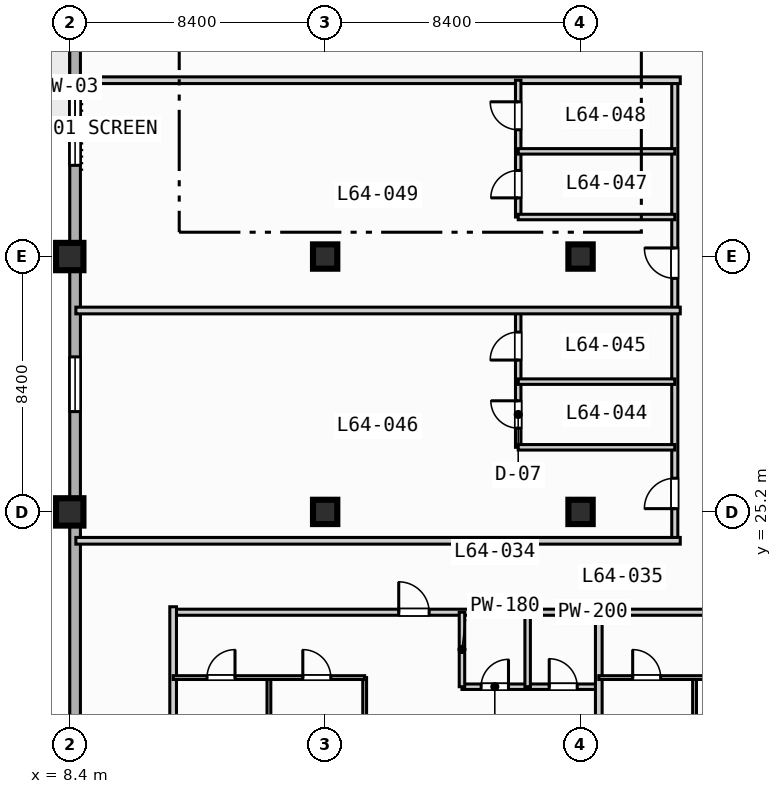
"""IFC4 building model, lengths in metres.
Left out: names, types, materials, properties, quantities, classifications, styles, units other than length and angle.
Written with IfcOpenShell. Run it as: python <this file> out.ifc"""

import sys

from ifc_helpers import new_model, si_unit, direction, frame, frame_2d, origin, origin_2d, place, context, subcontext, project, spatial, rectangle, extrude, element, fill, save


model = new_model("IFC4")
c1 = context("Model", 3, precision=1e-05, world=origin(), true_north=direction((0.0, 1.0)))
c2 = subcontext(c1, "Body", "Model", "MODEL_VIEW")
j1 = project(units=[si_unit("LENGTHUNIT", "METRE"), si_unit("PLANEANGLEUNIT", "RADIAN")], contexts=[c1])
p1 = place(None, origin())
s1 = spatial("IfcSite", under=j1, at=p1, CompositionType="ELEMENT")
p2 = place(p1, origin())
s2 = spatial("IfcBuilding", under=s1, at=p2, CompositionType="ELEMENT")
p3 = place(p2, frame((0.0, 0.0, 260.1)))
s3 = spatial("IfcBuildingStorey", under=s2, at=p3, CompositionType="ELEMENT", Elevation=260.1)
for number, where, z_axis, x_axis in (
    (1, (8.4, 25.2, 0.0), (0.0, 0.0, 1.0), (1.0, 0.0, 0.0)),
    (2, (8.4, 33.6, 0.0), (0.0, 0.0, 1.0), (1.0, 0.0, 0.0)),
):
    element("IfcColumn", number, at=place(p3, frame(where, z_axis=z_axis, x_axis=x_axis)), inside=s3, PredefinedType="COLUMN", context=c2, shape_type="SweptSolid", body=[
        extrude(rectangle(XDim=0.9, YDim=0.9, at=origin_2d()), origin(), (0.0, 0.0, 1.0), 3.7),
    ])
for number, where, z_axis, x_axis in (
    (3, (16.8, 25.2, 0.0), (0.0, 0.0, 1.0), (1.0, 0.0, 0.0)),
    (4, (16.8, 33.6, 0.0), (0.0, 0.0, 1.0), (1.0, 0.0, 0.0)),
    (5, (25.2, 25.2, 0.0), (0.0, 0.0, 1.0), (1.0, 0.0, 0.0)),
    (6, (25.2, 33.6, 0.0), (0.0, 0.0, 1.0), (1.0, 0.0, 0.0)),
):
    element("IfcColumn", number, at=place(p3, frame(where, z_axis=z_axis, x_axis=x_axis)), inside=s3, PredefinedType="COLUMN", context=c2, shape_type="SweptSolid", body=[
        extrude(rectangle(XDim=0.8, YDim=0.8, at=origin_2d()), origin(), (0.0, 0.0, 1.0), 3.7),
    ])
p4 = place(p3, frame((8.575, 11.575, 0.0), z_axis=(0.0, 0.0, 1.0), x_axis=(0.0, 1.0, 0.0)))
e7 = element("IfcWall", 7, at=p4, inside=s3, PredefinedType="STANDARD", context=c2, shape_type="SweptSolid", body=[
    extrude(rectangle(XDim=60.85, YDim=0.35, at=frame_2d((30.425, 0.0))), origin(), (0.0, 0.0, 1.0), 3.47),
])
p5 = place(p4, frame((33.925, 0.0, 0.0)))
e8 = element("IfcOpeningElement", 8, at=p5, cuts=e7, PredefinedType="OPENING", context=c2, shape_type="SweptSolid", body=[
    extrude(rectangle(XDim=1.4, YDim=2.2, at=frame_2d((0.7, 1.1))), frame((0.0, 0.185, 0.0), z_axis=(0.0, -1.0, 0.0), x_axis=(1.0, 0.0, 0.0)), (0.0, 0.0, 1.0), 0.37),
])
p6 = place(p4, frame((16.925, 0.0, 0.85)))
e9 = element("IfcOpeningElement", 9, at=p6, cuts=e7, PredefinedType="OPENING", context=c2, shape_type="SweptSolid", body=[
    extrude(rectangle(XDim=1.8, YDim=1.8, at=frame_2d((0.9, 0.9))), frame((0.0, 0.185, 0.0), z_axis=(0.0, -1.0, 0.0), x_axis=(1.0, 0.0, 0.0)), (0.0, 0.0, 1.0), 0.37),
])
p7 = place(p4, frame((25.025, 0.0, 0.85)))
e10 = element("IfcOpeningElement", 10, at=p7, cuts=e7, PredefinedType="OPENING", context=c2, shape_type="SweptSolid", body=[
    extrude(rectangle(XDim=2.4, YDim=1.95, at=frame_2d((1.2, 0.975))), frame((0.0, 0.185, 0.0), z_axis=(0.0, -1.0, 0.0), x_axis=(1.0, 0.0, 0.0)), (0.0, 0.0, 1.0), 0.37),
])
p8 = place(p4, frame((41.825, 0.0, 0.85)))
e11 = element("IfcOpeningElement", 11, at=p8, cuts=e7, PredefinedType="OPENING", context=c2, shape_type="SweptSolid", body=[
    extrude(rectangle(XDim=2.4, YDim=1.95, at=frame_2d((1.2, 0.975))), frame((0.0, 0.185, 0.0), z_axis=(0.0, -1.0, 0.0), x_axis=(1.0, 0.0, 0.0)), (0.0, 0.0, 1.0), 0.37),
])
p9 = place(p3, frame((11.8, 21.9, 0.0), z_axis=(0.0, 0.0, 1.0), x_axis=(1.0, 0.0, 0.0)))
e12 = element("IfcWall", 12, at=p9, inside=s3, PredefinedType="PARTITIONING", context=c2, shape_type="SweptSolid", body=[
    extrude(rectangle(XDim=27.6, YDim=0.2, at=frame_2d((13.8, 0.0))), origin(), (0.0, 0.0, 1.0), 3.47),
])
p10 = place(p9, frame((7.42, 0.0, 0.0)))
e13 = element("IfcOpeningElement", 13, at=p10, cuts=e12, PredefinedType="OPENING", context=c2, shape_type="SweptSolid", body=[
    extrude(rectangle(XDim=1.0, YDim=2.15, at=frame_2d((0.5, 1.075))), frame((0.0, 0.11, 0.0), z_axis=(0.0, -1.0, 0.0), x_axis=(1.0, 0.0, 0.0)), (0.0, 0.0, 1.0), 0.22),
])
p11 = place(p9, frame((21.22, 0.0, 0.0)))
e14 = element("IfcOpeningElement", 14, at=p11, cuts=e12, PredefinedType="OPENING", context=c2, shape_type="SweptSolid", body=[
    extrude(rectangle(XDim=1.0, YDim=2.15, at=frame_2d((0.5, 1.075))), frame((0.0, 0.11, 0.0), z_axis=(0.0, -1.0, 0.0), x_axis=(1.0, 0.0, 0.0)), (0.0, 0.0, 1.0), 0.22),
])
p12 = place(p3, frame((11.8, 8.6, 0.0), z_axis=(0.0, 0.0, 1.0), x_axis=(0.0, 1.0, 0.0)))
e15 = element("IfcWall", 15, at=p12, inside=s3, PredefinedType="PARTITIONING", context=c2, shape_type="SweptSolid", body=[
    extrude(rectangle(XDim=13.48, YDim=0.22, at=frame_2d((6.74, 0.0))), origin(), (0.0, 0.0, 1.0), 3.47),
])
p13 = place(p3, frame((21.3, 19.45, 0.0), z_axis=(0.0, 0.0, 1.0), x_axis=(1.0, 0.0, 0.0)))
e16 = element("IfcWall", 16, at=p13, inside=s3, PredefinedType="PLUMBINGWALL", context=c2, shape_type="SweptSolid", body=[
    extrude(rectangle(XDim=4.5, YDim=0.18, at=frame_2d((2.25, 0.0))), origin(), (0.0, 0.0, 1.0), 3.47),
])
p14 = place(p13, frame((0.63, 0.0, 0.0)))
e17 = element("IfcOpeningElement", 17, at=p14, cuts=e16, PredefinedType="OPENING", context=c2, shape_type="SweptSolid", body=[
    extrude(rectangle(XDim=0.9, YDim=2.1, at=frame_2d((0.45, 1.05))), frame((0.0, 0.1, 0.0), z_axis=(0.0, -1.0, 0.0), x_axis=(1.0, 0.0, 0.0)), (0.0, 0.0, 1.0), 0.2),
])
p15 = place(p13, frame((2.87, 0.0, 0.0)))
e18 = element("IfcOpeningElement", 18, at=p15, cuts=e16, PredefinedType="OPENING", context=c2, shape_type="SweptSolid", body=[
    extrude(rectangle(XDim=0.92, YDim=2.1, at=frame_2d((0.46, 1.05))), frame((0.0, 0.1, 0.0), z_axis=(0.0, -1.0, 0.0), x_axis=(1.0, 0.0, 0.0)), (0.0, 0.0, 1.0), 0.2),
])
for number, where, z_axis, x_axis in (
    (19, (21.3, 19.45, 0.0), (0.0, 0.0, 1.0), (0.0, 1.0, 0.0)),
    (20, (23.46, 19.45, 0.0), (0.0, 0.0, 1.0), (0.0, 1.0, 0.0)),
):
    element("IfcWall", number, at=place(p3, frame(where, z_axis=z_axis, x_axis=x_axis)), inside=s3, PredefinedType="PLUMBINGWALL", context=c2, shape_type="SweptSolid", body=[
        extrude(rectangle(XDim=2.45, YDim=0.18, at=frame_2d((1.225, 0.0))), origin(), (0.0, 0.0, 1.0), 3.47),
    ])
for number, where, z_axis, x_axis in (
    (21, (14.95, 8.75, 0.0), (0.0, 0.0, 1.0), (0.0, 1.0, 0.0)),
    (22, (18.1, 8.75, 0.0), (0.0, 0.0, 1.0), (0.0, 1.0, 0.0)),
):
    element("IfcWall", number, at=place(p3, frame(where, z_axis=z_axis, x_axis=x_axis)), inside=s3, PredefinedType="PARTITIONING", context=c2, shape_type="SweptSolid", body=[
        extrude(rectangle(XDim=11.0, YDim=0.125, at=frame_2d((5.5, 0.0))), origin(), (0.0, 0.0, 1.0), 3.47),
    ])
p16 = place(p3, frame((11.8, 19.75, 0.0), z_axis=(0.0, 0.0, 1.0), x_axis=(1.0, 0.0, 0.0)))
e23 = element("IfcWall", 23, at=p16, inside=s3, PredefinedType="PARTITIONING", context=c2, shape_type="SweptSolid", body=[
    extrude(rectangle(XDim=6.3, YDim=0.125, at=frame_2d((3.15, 0.0))), origin(), (0.0, 0.0, 1.0), 3.47),
])
p17 = place(p16, frame((1.115, 0.0, 0.0)))
e24 = element("IfcOpeningElement", 24, at=p17, cuts=e23, PredefinedType="OPENING", context=c2, shape_type="SweptSolid", body=[
    extrude(rectangle(XDim=0.92, YDim=2.1, at=frame_2d((0.46, 1.05))), frame((0.0, 0.073, 0.0), z_axis=(0.0, -1.0, 0.0), x_axis=(1.0, 0.0, 0.0)), (0.0, 0.0, 1.0), 0.145),
])
p18 = place(p16, frame((4.265, 0.0, 0.0)))
e25 = element("IfcOpeningElement", 25, at=p18, cuts=e23, PredefinedType="OPENING", context=c2, shape_type="SweptSolid", body=[
    extrude(rectangle(XDim=0.92, YDim=2.1, at=frame_2d((0.46, 1.05))), frame((0.0, 0.073, 0.0), z_axis=(0.0, -1.0, 0.0), x_axis=(1.0, 0.0, 0.0)), (0.0, 0.0, 1.0), 0.145),
])
p19 = place(p3, frame((25.8, 8.6, 0.0), z_axis=(0.0, 0.0, 1.0), x_axis=(0.0, 1.0, 0.0)))
e26 = element("IfcWall", 26, at=p19, inside=s3, PredefinedType="PARTITIONING", context=c2, shape_type="SweptSolid", body=[
    extrude(rectangle(XDim=13.48, YDim=0.22, at=frame_2d((6.74, 0.0))), origin(), (0.0, 0.0, 1.0), 3.47),
])
p20 = place(p3, frame((28.95, 8.75, 0.0), z_axis=(0.0, 0.0, 1.0), x_axis=(0.0, 1.0, 0.0)))
e27 = element("IfcWall", 27, at=p20, inside=s3, PredefinedType="PARTITIONING", context=c2, shape_type="SweptSolid", body=[
    extrude(rectangle(XDim=11.0, YDim=0.125, at=frame_2d((5.5, 0.0))), origin(), (0.0, 0.0, 1.0), 3.47),
])
p21 = place(p3, frame((25.8, 19.75, 0.0), z_axis=(0.0, 0.0, 1.0), x_axis=(1.0, 0.0, 0.0)))
e28 = element("IfcWall", 28, at=p21, inside=s3, PredefinedType="PARTITIONING", context=c2, shape_type="SweptSolid", body=[
    extrude(rectangle(XDim=6.3, YDim=0.125, at=frame_2d((3.15, 0.0))), origin(), (0.0, 0.0, 1.0), 3.47),
])
p22 = place(p21, frame((1.115, 0.0, 0.0)))
e29 = element("IfcOpeningElement", 29, at=p22, cuts=e28, PredefinedType="OPENING", context=c2, shape_type="SweptSolid", body=[
    extrude(rectangle(XDim=0.92, YDim=2.1, at=frame_2d((0.46, 1.05))), frame((0.0, 0.073, 0.0), z_axis=(0.0, -1.0, 0.0), x_axis=(1.0, 0.0, 0.0)), (0.0, 0.0, 1.0), 0.145),
])
p23 = place(p21, frame((4.265, 0.0, 0.0)))
e30 = element("IfcOpeningElement", 30, at=p23, cuts=e28, PredefinedType="OPENING", context=c2, shape_type="SweptSolid", body=[
    extrude(rectangle(XDim=0.92, YDim=2.1, at=frame_2d((0.46, 1.05))), frame((0.0, 0.073, 0.0), z_axis=(0.0, -1.0, 0.0), x_axis=(1.0, 0.0, 0.0)), (0.0, 0.0, 1.0), 0.145),
])
p24 = place(p3, frame((28.3, 24.25, 0.0), z_axis=(0.0, 0.0, 1.0), x_axis=(0.0, 1.0, 0.0)))
e31 = element("IfcWall", 31, at=p24, inside=s3, PredefinedType="PARTITIONING", context=c2, shape_type="SweptSolid", body=[
    extrude(rectangle(XDim=15.15, YDim=0.2, at=frame_2d((7.575, 0.0))), origin(), (0.0, 0.0, 1.0), 3.47),
])
p25 = place(p24, frame((1.058, 0.0, 0.0)))
e32 = element("IfcOpeningElement", 32, at=p25, cuts=e31, PredefinedType="OPENING", context=c2, shape_type="SweptSolid", body=[
    extrude(rectangle(XDim=1.0, YDim=2.15, at=frame_2d((0.5, 1.075))), frame((0.0, 0.11, 0.0), z_axis=(0.0, -1.0, 0.0), x_axis=(1.0, 0.0, 0.0)), (0.0, 0.0, 1.0), 0.22),
])
p26 = place(p24, frame((8.633, 0.0, 0.0)))
e33 = element("IfcOpeningElement", 33, at=p26, cuts=e31, PredefinedType="OPENING", context=c2, shape_type="SweptSolid", body=[
    extrude(rectangle(XDim=1.0, YDim=2.15, at=frame_2d((0.5, 1.075))), frame((0.0, 0.11, 0.0), z_axis=(0.0, -1.0, 0.0), x_axis=(1.0, 0.0, 0.0)), (0.0, 0.0, 1.0), 0.22),
])
p27 = place(p3, frame((8.6, 24.25, 0.0), z_axis=(0.0, 0.0, 1.0), x_axis=(1.0, 0.0, 0.0)))
e34 = element("IfcWall", 34, at=p27, inside=s3, PredefinedType="PARTITIONING", context=c2, shape_type="SweptSolid", body=[
    extrude(rectangle(XDim=19.88, YDim=0.22, at=frame_2d((9.94, 0.0))), origin(), (0.0, 0.0, 1.0), 3.47),
])
p28 = place(p3, frame((23.15, 27.325, 0.0), z_axis=(0.0, 0.0, 1.0), x_axis=(0.0, 1.0, 0.0)))
e35 = element("IfcWall", 35, at=p28, inside=s3, PredefinedType="PLUMBINGWALL", context=c2, shape_type="SweptSolid", body=[
    extrude(rectangle(XDim=4.5, YDim=0.18, at=frame_2d((2.25, 0.0))), origin(), (0.0, 0.0, 1.0), 3.47),
])
p29 = place(p28, frame((0.63, 0.0, 0.0)))
e36 = element("IfcOpeningElement", 36, at=p29, cuts=e35, PredefinedType="OPENING", context=c2, shape_type="SweptSolid", body=[
    extrude(rectangle(XDim=0.9, YDim=2.1, at=frame_2d((0.45, 1.05))), frame((0.0, 0.1, 0.0), z_axis=(0.0, -1.0, 0.0), x_axis=(1.0, 0.0, 0.0)), (0.0, 0.0, 1.0), 0.2),
])
p30 = place(p28, frame((2.87, 0.0, 0.0)))
e37 = element("IfcOpeningElement", 37, at=p30, cuts=e35, PredefinedType="OPENING", context=c2, shape_type="SweptSolid", body=[
    extrude(rectangle(XDim=0.92, YDim=2.1, at=frame_2d((0.46, 1.05))), frame((0.0, 0.1, 0.0), z_axis=(0.0, -1.0, 0.0), x_axis=(1.0, 0.0, 0.0)), (0.0, 0.0, 1.0), 0.2),
])
for number, where, z_axis, x_axis in (
    (38, (23.15, 27.325, 0.0), (0.0, 0.0, 1.0), (1.0, 0.0, 0.0)),
    (39, (23.15, 29.485, 0.0), (0.0, 0.0, 1.0), (1.0, 0.0, 0.0)),
):
    element("IfcWall", number, at=place(p3, frame(where, z_axis=z_axis, x_axis=x_axis)), inside=s3, PredefinedType="PLUMBINGWALL", context=c2, shape_type="SweptSolid", body=[
        extrude(rectangle(XDim=5.15, YDim=0.18, at=frame_2d((2.575, 0.0))), origin(), (0.0, 0.0, 1.0), 3.47),
    ])
for number, where, z_axis, x_axis in (
    (40, (8.6, 31.825, 0.0), (0.0, 0.0, 1.0), (1.0, 0.0, 0.0)),
    (41, (8.6, 39.4, 0.0), (0.0, 0.0, 1.0), (1.0, 0.0, 0.0)),
):
    element("IfcWall", number, at=place(p3, frame(where, z_axis=z_axis, x_axis=x_axis)), inside=s3, PredefinedType="PARTITIONING", context=c2, shape_type="SweptSolid", body=[
        extrude(rectangle(XDim=19.88, YDim=0.22, at=frame_2d((9.94, 0.0))), origin(), (0.0, 0.0, 1.0), 3.47),
    ])
p31 = place(p3, frame((23.15, 34.9, 0.0), z_axis=(0.0, 0.0, 1.0), x_axis=(0.0, 1.0, 0.0)))
e42 = element("IfcWall", 42, at=p31, inside=s3, PredefinedType="PLUMBINGWALL", context=c2, shape_type="SweptSolid", body=[
    extrude(rectangle(XDim=4.5, YDim=0.18, at=frame_2d((2.25, 0.0))), origin(), (0.0, 0.0, 1.0), 3.47),
])
p32 = place(p31, frame((0.63, 0.0, 0.0)))
e43 = element("IfcOpeningElement", 43, at=p32, cuts=e42, PredefinedType="OPENING", context=c2, shape_type="SweptSolid", body=[
    extrude(rectangle(XDim=0.9, YDim=2.1, at=frame_2d((0.45, 1.05))), frame((0.0, 0.1, 0.0), z_axis=(0.0, -1.0, 0.0), x_axis=(1.0, 0.0, 0.0)), (0.0, 0.0, 1.0), 0.2),
])
p33 = place(p31, frame((2.87, 0.0, 0.0)))
e44 = element("IfcOpeningElement", 44, at=p33, cuts=e42, PredefinedType="OPENING", context=c2, shape_type="SweptSolid", body=[
    extrude(rectangle(XDim=0.92, YDim=2.1, at=frame_2d((0.46, 1.05))), frame((0.0, 0.1, 0.0), z_axis=(0.0, -1.0, 0.0), x_axis=(1.0, 0.0, 0.0)), (0.0, 0.0, 1.0), 0.2),
])
for number, where, z_axis, x_axis in (
    (45, (23.15, 34.9, 0.0), (0.0, 0.0, 1.0), (1.0, 0.0, 0.0)),
    (46, (23.15, 37.06, 0.0), (0.0, 0.0, 1.0), (1.0, 0.0, 0.0)),
):
    element("IfcWall", number, at=place(p3, frame(where, z_axis=z_axis, x_axis=x_axis)), inside=s3, PredefinedType="PLUMBINGWALL", context=c2, shape_type="SweptSolid", body=[
        extrude(rectangle(XDim=5.15, YDim=0.18, at=frame_2d((2.575, 0.0))), origin(), (0.0, 0.0, 1.0), 3.47),
    ])
p34 = place(p6, origin())
e47 = element("IfcWindow", 47, at=p34, inside=s3, PartitioningType="SINGLE_PANEL", PredefinedType="WINDOW", context=c2, shape_type="SweptSolid", body=[
    extrude(rectangle(XDim=1.8, YDim=1.8, at=frame_2d((0.9, 0.9))), frame((0.0, 0.03, 0.0), z_axis=(0.0, -1.0, 0.0), x_axis=(1.0, 0.0, 0.0)), (0.0, 0.0, 1.0), 0.06),
])
fill(e9, e47)
p35 = place(p7, origin())
e48 = element("IfcWindow", 48, at=p35, inside=s3, PartitioningType="SINGLE_PANEL", PredefinedType="WINDOW", context=c2, shape_type="SweptSolid", body=[
    extrude(rectangle(XDim=2.4, YDim=1.95, at=frame_2d((1.2, 0.975))), frame((0.0, 0.03, 0.0), z_axis=(0.0, -1.0, 0.0), x_axis=(1.0, 0.0, 0.0)), (0.0, 0.0, 1.0), 0.06),
])
fill(e10, e48)
p36 = place(p10, origin())
e49 = element("IfcDoor", 49, at=p36, inside=s3, OperationType="SINGLE_SWING_LEFT", PredefinedType="DOOR", context=c2, shape_type="SweptSolid", body=[
    extrude(rectangle(XDim=1.0, YDim=2.15, at=frame_2d((0.5, 1.075))), frame((0.0, 0.025, 0.0), z_axis=(0.0, -1.0, 0.0), x_axis=(1.0, 0.0, 0.0)), (0.0, 0.0, 1.0), 0.05),
])
fill(e13, e49)
p37 = place(p14, origin())
e50 = element("IfcDoor", 50, at=p37, inside=s3, OperationType="SINGLE_SWING_RIGHT", PredefinedType="DOOR", context=c2, shape_type="SweptSolid", body=[
    extrude(rectangle(XDim=0.9, YDim=2.1, at=frame_2d((0.45, 1.05))), frame((0.0, 0.025, 0.0), z_axis=(0.0, -1.0, 0.0), x_axis=(1.0, 0.0, 0.0)), (0.0, 0.0, 1.0), 0.05),
])
fill(e17, e50)
p38 = place(p15, origin())
e51 = element("IfcDoor", 51, at=p38, inside=s3, OperationType="SINGLE_SWING_LEFT", PredefinedType="DOOR", context=c2, shape_type="SweptSolid", body=[
    extrude(rectangle(XDim=0.92, YDim=2.1, at=frame_2d((0.46, 1.05))), frame((0.0, 0.025, 0.0), z_axis=(0.0, -1.0, 0.0), x_axis=(1.0, 0.0, 0.0)), (0.0, 0.0, 1.0), 0.05),
])
fill(e18, e51)
p39 = place(p17, origin())
e52 = element("IfcDoor", 52, at=p39, inside=s3, OperationType="SINGLE_SWING_RIGHT", PredefinedType="DOOR", context=c2, shape_type="SweptSolid", body=[
    extrude(rectangle(XDim=0.92, YDim=2.1, at=frame_2d((0.46, 1.05))), frame((0.0, 0.025, 0.0), z_axis=(0.0, -1.0, 0.0), x_axis=(1.0, 0.0, 0.0)), (0.0, 0.0, 1.0), 0.05),
])
fill(e24, e52)
p40 = place(p18, origin())
e53 = element("IfcDoor", 53, at=p40, inside=s3, OperationType="SINGLE_SWING_LEFT", PredefinedType="DOOR", context=c2, shape_type="SweptSolid", body=[
    extrude(rectangle(XDim=0.92, YDim=2.1, at=frame_2d((0.46, 1.05))), frame((0.0, 0.025, 0.0), z_axis=(0.0, -1.0, 0.0), x_axis=(1.0, 0.0, 0.0)), (0.0, 0.0, 1.0), 0.05),
])
fill(e25, e53)
p41 = place(p22, origin())
e54 = element("IfcDoor", 54, at=p41, inside=s3, OperationType="SINGLE_SWING_LEFT", PredefinedType="DOOR", context=c2, shape_type="SweptSolid", body=[
    extrude(rectangle(XDim=0.92, YDim=2.1, at=frame_2d((0.46, 1.05))), frame((0.0, 0.025, 0.0), z_axis=(0.0, -1.0, 0.0), x_axis=(1.0, 0.0, 0.0)), (0.0, 0.0, 1.0), 0.05),
])
fill(e29, e54)
p42 = place(p25, origin())
e55 = element("IfcDoor", 55, at=p42, inside=s3, OperationType="SINGLE_SWING_LEFT", PredefinedType="DOOR", context=c2, shape_type="SweptSolid", body=[
    extrude(rectangle(XDim=1.0, YDim=2.15, at=frame_2d((0.5, 1.075))), frame((0.0, 0.025, 0.0), z_axis=(0.0, -1.0, 0.0), x_axis=(1.0, 0.0, 0.0)), (0.0, 0.0, 1.0), 0.05),
])
fill(e32, e55)
p43 = place(p26, origin())
e56 = element("IfcDoor", 56, at=p43, inside=s3, OperationType="SINGLE_SWING_RIGHT", PredefinedType="DOOR", context=c2, shape_type="SweptSolid", body=[
    extrude(rectangle(XDim=1.0, YDim=2.15, at=frame_2d((0.5, 1.075))), frame((0.0, 0.025, 0.0), z_axis=(0.0, -1.0, 0.0), x_axis=(1.0, 0.0, 0.0)), (0.0, 0.0, 1.0), 0.05),
])
fill(e33, e56)
p44 = place(p29, origin())
e57 = element("IfcDoor", 57, at=p44, inside=s3, OperationType="SINGLE_SWING_RIGHT", PredefinedType="DOOR", context=c2, shape_type="SweptSolid", body=[
    extrude(rectangle(XDim=0.9, YDim=2.1, at=frame_2d((0.45, 1.05))), frame((0.0, 0.025, 0.0), z_axis=(0.0, -1.0, 0.0), x_axis=(1.0, 0.0, 0.0)), (0.0, 0.0, 1.0), 0.05),
])
fill(e36, e57)
p45 = place(p30, origin())
e58 = element("IfcDoor", 58, at=p45, inside=s3, OperationType="SINGLE_SWING_LEFT", PredefinedType="DOOR", context=c2, shape_type="SweptSolid", body=[
    extrude(rectangle(XDim=0.92, YDim=2.1, at=frame_2d((0.46, 1.05))), frame((0.0, 0.025, 0.0), z_axis=(0.0, -1.0, 0.0), x_axis=(1.0, 0.0, 0.0)), (0.0, 0.0, 1.0), 0.05),
])
fill(e37, e58)
p46 = place(p32, origin())
e59 = element("IfcDoor", 59, at=p46, inside=s3, OperationType="SINGLE_SWING_LEFT", PredefinedType="DOOR", context=c2, shape_type="SweptSolid", body=[
    extrude(rectangle(XDim=0.9, YDim=2.1, at=frame_2d((0.45, 1.05))), frame((0.0, 0.025, 0.0), z_axis=(0.0, -1.0, 0.0), x_axis=(1.0, 0.0, 0.0)), (0.0, 0.0, 1.0), 0.05),
])
fill(e43, e59)
p47 = place(p33, origin())
e60 = element("IfcDoor", 60, at=p47, inside=s3, OperationType="SINGLE_SWING_RIGHT", PredefinedType="DOOR", context=c2, shape_type="SweptSolid", body=[
    extrude(rectangle(XDim=0.92, YDim=2.1, at=frame_2d((0.46, 1.05))), frame((0.0, 0.025, 0.0), z_axis=(0.0, -1.0, 0.0), x_axis=(1.0, 0.0, 0.0)), (0.0, 0.0, 1.0), 0.05),
])
fill(e44, e60)
save(model, sys.argv[1])
